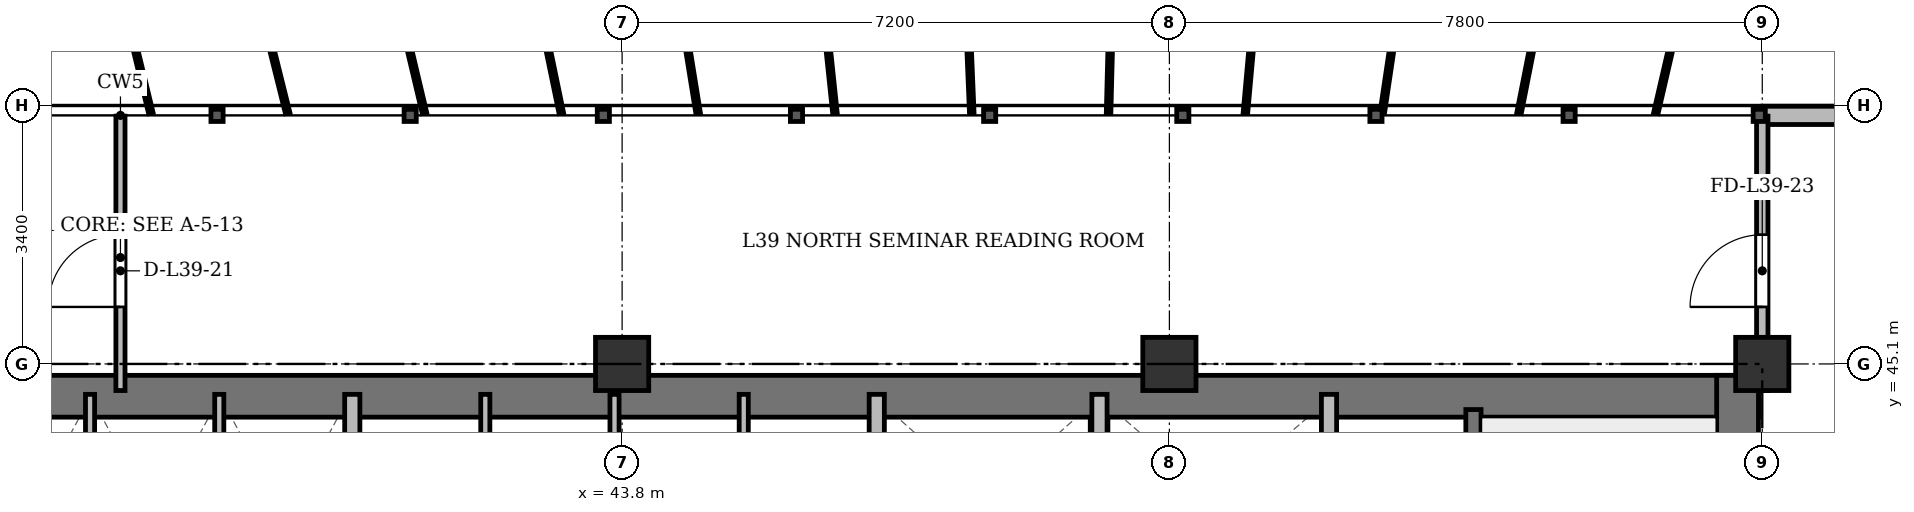
"""IFC4 building model, lengths in metres.
Left out: names, types, materials, properties, quantities, classifications, styles, units other than length and angle.
Written with IfcOpenShell. Run it as: python <this file> out.ifc"""

import sys

from ifc_helpers import new_model, si_unit, direction, frame, frame_2d, origin, origin_2d, place, context, subcontext, project, spatial, rectangle, extrude, source, transform, mapped, element, fill, save


model = new_model("IFC4")
c1 = context("Model", 3, precision=1e-05, world=origin(), true_north=direction((0.0, 1.0)))
c2 = subcontext(c1, "Body", "Model", "MODEL_VIEW")
j1 = project(units=[si_unit("LENGTHUNIT", "METRE"), si_unit("PLANEANGLEUNIT", "RADIAN")], contexts=[c1])
p1 = place(None, origin())
s1 = spatial("IfcSite", under=j1, at=p1, CompositionType="ELEMENT")
p2 = place(p1, origin())
s2 = spatial("IfcBuilding", under=s1, at=p2, CompositionType="ELEMENT")
p3 = place(p2, frame((0.0, 0.0, 150.1)))
s3 = spatial("IfcBuildingStorey", under=s2, at=p3, CompositionType="ELEMENT", Elevation=150.1)
m1 = source(origin(), c2, "Body", "SweptSolid", [
    extrude(rectangle(XDim=0.7, YDim=0.7, at=origin_2d()), origin(), (0.0, 0.0, 1.0), 3.6),
])
for number, where, z_axis, x_axis in (
    (1, (43.8, 45.1, 0.0), (0.0, 0.0, 1.0), (1.0, 0.0, 0.0)),
    (2, (51.0, 45.1, 0.0), (0.0, 0.0, 1.0), (1.0, 0.0, 0.0)),
    (3, (58.8, 45.1, 0.0), (0.0, 0.0, 1.0), (1.0, 0.0, 0.0)),
):
    element("IfcColumn", number, at=place(p3, frame(where, z_axis=z_axis, x_axis=x_axis)), inside=s3, PredefinedType="COLUMN", context=c2, shape_type="MappedRepresentation", body=[
        mapped(m1, transform((0.0, 0.0, 0.0), x_axis=(1.0, 0.0, 0.0), y_axis=(0.0, 1.0, 0.0), z_axis=(0.0, 0.0, 1.0), scale=1.0)),
    ])
p4 = place(p3, frame((58.8, 48.37, 0.0), z_axis=(0.0, 0.0, 1.0), x_axis=(1.0, 0.0, 0.0)))
e4 = element("IfcWall", 4, at=p4, inside=s3, PredefinedType="SOLIDWALL", context=c2, shape_type="SweptSolid", body=[
    extrude(rectangle(XDim=4.7, YDim=0.24, at=frame_2d((2.35, 0.0))), origin(), (0.0, 0.0, 1.0), 3.35),
])
p5 = place(p4, frame((1.675, 0.0, 0.9)))
e5 = element("IfcOpeningElement", 5, at=p5, cuts=e4, PredefinedType="OPENING", context=c2, shape_type="SweptSolid", body=[
    extrude(rectangle(XDim=1.35, YDim=1.5, at=frame_2d((0.675, 0.75))), frame((0.0, 0.13, 0.0), z_axis=(0.0, -1.0, 0.0), x_axis=(1.0, 0.0, 0.0)), (0.0, 0.0, 1.0), 0.26),
])
p6 = place(p3, frame((15.65, 44.675, 0.0), z_axis=(0.0, 0.0, 1.0), x_axis=(1.0, 0.0, 0.0)))
e6 = element("IfcWall", 6, at=p6, inside=s3, PredefinedType="SHEAR", context=c2, shape_type="SweptSolid", body=[
    extrude(rectangle(XDim=43.1, YDim=0.55, at=frame_2d((21.55, 0.0))), origin(), (0.0, 0.0, 1.0), 3.35),
])
p7 = place(p3, frame((58.475, 33.4, 0.0), z_axis=(0.0, 0.0, 1.0), x_axis=(0.0, 1.0, 0.0)))
e7 = element("IfcWall", 7, at=p7, inside=s3, PredefinedType="SHEAR", context=c2, shape_type="SweptSolid", body=[
    extrude(rectangle(XDim=11.55, YDim=0.55, at=frame_2d((5.775, 0.0))), origin(), (0.0, 0.0, 1.0), 3.35),
])
p8 = place(p3, frame((55.0, 33.4, 0.0), z_axis=(0.0, 0.0, 1.0), x_axis=(0.0, 1.0, 0.0)))
e8 = element("IfcWall", 8, at=p8, inside=s3, PredefinedType="SHEAR", context=c2, shape_type="SweptSolid", body=[
    extrude(rectangle(XDim=11.1, YDim=0.2, at=frame_2d((5.55, 0.0))), origin(), (0.0, 0.0, 1.0), 3.35),
])
p9 = place(p8, frame((0.85, 0.0, 0.0)))
e9 = element("IfcOpeningElement", 9, at=p9, cuts=e8, PredefinedType="OPENING", context=c2, shape_type="SweptSolid", body=[
    extrude(rectangle(XDim=1.1, YDim=2.15, at=frame_2d((0.55, 1.075))), frame((0.0, 0.11, 0.0), z_axis=(0.0, -1.0, 0.0), x_axis=(1.0, 0.0, 0.0)), (0.0, 0.0, 1.0), 0.22),
])
for number, where, z_axis, x_axis in (
    (10, (36.8, 41.5, 0.0), (0.0, 0.0, 1.0), (0.0, 1.0, 0.0)),
    (11, (38.5, 41.5, 0.0), (0.0, 0.0, 1.0), (0.0, 1.0, 0.0)),
):
    element("IfcWall", number, at=place(p3, frame(where, z_axis=z_axis, x_axis=x_axis)), inside=s3, PredefinedType="PARTITIONING", context=c2, shape_type="SweptSolid", body=[
        extrude(rectangle(XDim=3.2, YDim=0.12, at=frame_2d((1.6, 0.0))), origin(), (0.0, 0.0, 1.0), 3.35),
    ])
p10 = place(p3, frame((40.25, 41.5, 0.0), z_axis=(0.0, 0.0, 1.0), x_axis=(0.0, 1.0, 0.0)))
e12 = element("IfcWall", 12, at=p10, inside=s3, PredefinedType="SOLIDWALL", context=c2, shape_type="SweptSolid", body=[
    extrude(rectangle(XDim=3.2, YDim=0.2, at=frame_2d((1.6, 0.0))), origin(), (0.0, 0.0, 1.0), 3.35),
])
p11 = place(p3, frame((42.0, 41.5, 0.0), z_axis=(0.0, 0.0, 1.0), x_axis=(0.0, 1.0, 0.0)))
e13 = element("IfcWall", 13, at=p11, inside=s3, PredefinedType="PARTITIONING", context=c2, shape_type="SweptSolid", body=[
    extrude(rectangle(XDim=3.2, YDim=0.12, at=frame_2d((1.6, 0.0))), origin(), (0.0, 0.0, 1.0), 3.35),
])
p12 = place(p3, frame((43.7, 41.5, 0.0), z_axis=(0.0, 0.0, 1.0), x_axis=(0.0, 1.0, 0.0)))
e14 = element("IfcWall", 14, at=p12, inside=s3, PredefinedType="PARTITIONING", context=c2, shape_type="SweptSolid", body=[
    extrude(rectangle(XDim=3.2, YDim=0.12, at=frame_2d((1.6, 0.0))), origin(), (0.0, 0.0, 1.0), 2.85),
])
p13 = place(p3, frame((45.4, 41.5, 0.0), z_axis=(0.0, 0.0, 1.0), x_axis=(0.0, 1.0, 0.0)))
e15 = element("IfcWall", 15, at=p13, inside=s3, PredefinedType="PARTITIONING", context=c2, shape_type="SweptSolid", body=[
    extrude(rectangle(XDim=3.2, YDim=0.12, at=frame_2d((1.6, 0.0))), origin(), (0.0, 0.0, 1.0), 3.35),
])
p14 = place(p3, frame((47.15, 33.4, 0.0), z_axis=(0.0, 0.0, 1.0), x_axis=(0.0, 1.0, 0.0)))
e16 = element("IfcWall", 16, at=p14, inside=s3, PredefinedType="SOLIDWALL", context=c2, shape_type="SweptSolid", body=[
    extrude(rectangle(XDim=11.3, YDim=0.2, at=frame_2d((5.65, 0.0))), origin(), (0.0, 0.0, 1.0), 2.75),
])
for number, where, z_axis, x_axis in (
    (17, (50.08, 42.05, 0.0), (0.0, 0.0, 1.0), (0.0, 1.0, 0.0)),
    (18, (53.1, 42.05, 0.0), (0.0, 0.0, 1.0), (0.0, 1.0, 0.0)),
):
    element("IfcWall", number, at=place(p3, frame(where, z_axis=z_axis, x_axis=x_axis)), inside=s3, PredefinedType="SOLIDWALL", context=c2, shape_type="SweptSolid", body=[
        extrude(rectangle(XDim=2.65, YDim=0.2, at=frame_2d((1.325, 0.0))), origin(), (0.0, 0.0, 1.0), 3.35),
    ])
p15 = place(p3, frame((37.2, 44.75, 0.0), z_axis=(0.0, 0.0, 1.0), x_axis=(0.0, 1.0, 0.0)))
e19 = element("IfcWall", 19, at=p15, inside=s3, PredefinedType="PARTITIONING", context=c2, shape_type="SweptSolid", body=[
    extrude(rectangle(XDim=3.61, YDim=0.12, at=frame_2d((1.805, 0.0))), origin(), (0.0, 0.0, 1.0), 2.75),
])
p16 = place(p15, frame((1.1, 0.0, 0.0)))
e20 = element("IfcOpeningElement", 20, at=p16, cuts=e19, PredefinedType="OPENING", context=c2, shape_type="SweptSolid", body=[
    extrude(rectangle(XDim=0.95, YDim=2.15, at=frame_2d((0.475, 1.075))), frame((0.0, 0.07, 0.0), z_axis=(0.0, -1.0, 0.0), x_axis=(1.0, 0.0, 0.0)), (0.0, 0.0, 1.0), 0.14),
])
p17 = place(p3, frame((58.8, 44.75, 0.0), z_axis=(0.0, 0.0, 1.0), x_axis=(0.0, 1.0, 0.0)))
e21 = element("IfcWall", 21, at=p17, inside=s3, PredefinedType="PARTITIONING", context=c2, shape_type="SweptSolid", body=[
    extrude(rectangle(XDim=3.61, YDim=0.15, at=frame_2d((1.805, 0.0))), origin(), (0.0, 0.0, 1.0), 2.85),
])
p18 = place(p17, frame((1.1, 0.0, 0.0)))
e22 = element("IfcOpeningElement", 22, at=p18, cuts=e21, PredefinedType="OPENING", context=c2, shape_type="SweptSolid", body=[
    extrude(rectangle(XDim=0.95, YDim=2.15, at=frame_2d((0.475, 1.075))), frame((0.0, 0.085, 0.0), z_axis=(0.0, -1.0, 0.0), x_axis=(1.0, 0.0, 0.0)), (0.0, 0.0, 1.0), 0.17),
])
m2 = source(origin(), c2, "Body", "SweptSolid", [
    extrude(rectangle(XDim=0.95, YDim=2.15, at=frame_2d((0.475, 1.075))), frame((0.0, 0.025, 0.0), z_axis=(0.0, -1.0, 0.0), x_axis=(1.0, 0.0, 0.0)), (0.0, 0.0, 1.0), 0.05),
])
p19 = place(p16, origin())
e23 = element("IfcDoor", 23, at=p19, inside=s3, OperationType="SINGLE_SWING_LEFT", PredefinedType="DOOR", context=c2, shape_type="MappedRepresentation", body=[
    mapped(m2, transform((0.0, 0.0, 0.0), x_axis=(1.0, 0.0, 0.0), y_axis=(0.0, 1.0, 0.0), z_axis=(0.0, 0.0, 1.0), scale=1.0)),
])
fill(e20, e23)
p20 = place(p18, origin())
e24 = element("IfcDoor", 24, at=p20, inside=s3, OperationType="SINGLE_SWING_LEFT", PredefinedType="DOOR", context=c2, shape_type="MappedRepresentation", body=[
    mapped(m2, transform((0.0, 0.0, 0.0), x_axis=(1.0, 0.0, 0.0), y_axis=(0.0, 1.0, 0.0), z_axis=(0.0, 0.0, 1.0), scale=1.0)),
])
fill(e22, e24)
save(model, sys.argv[1])
